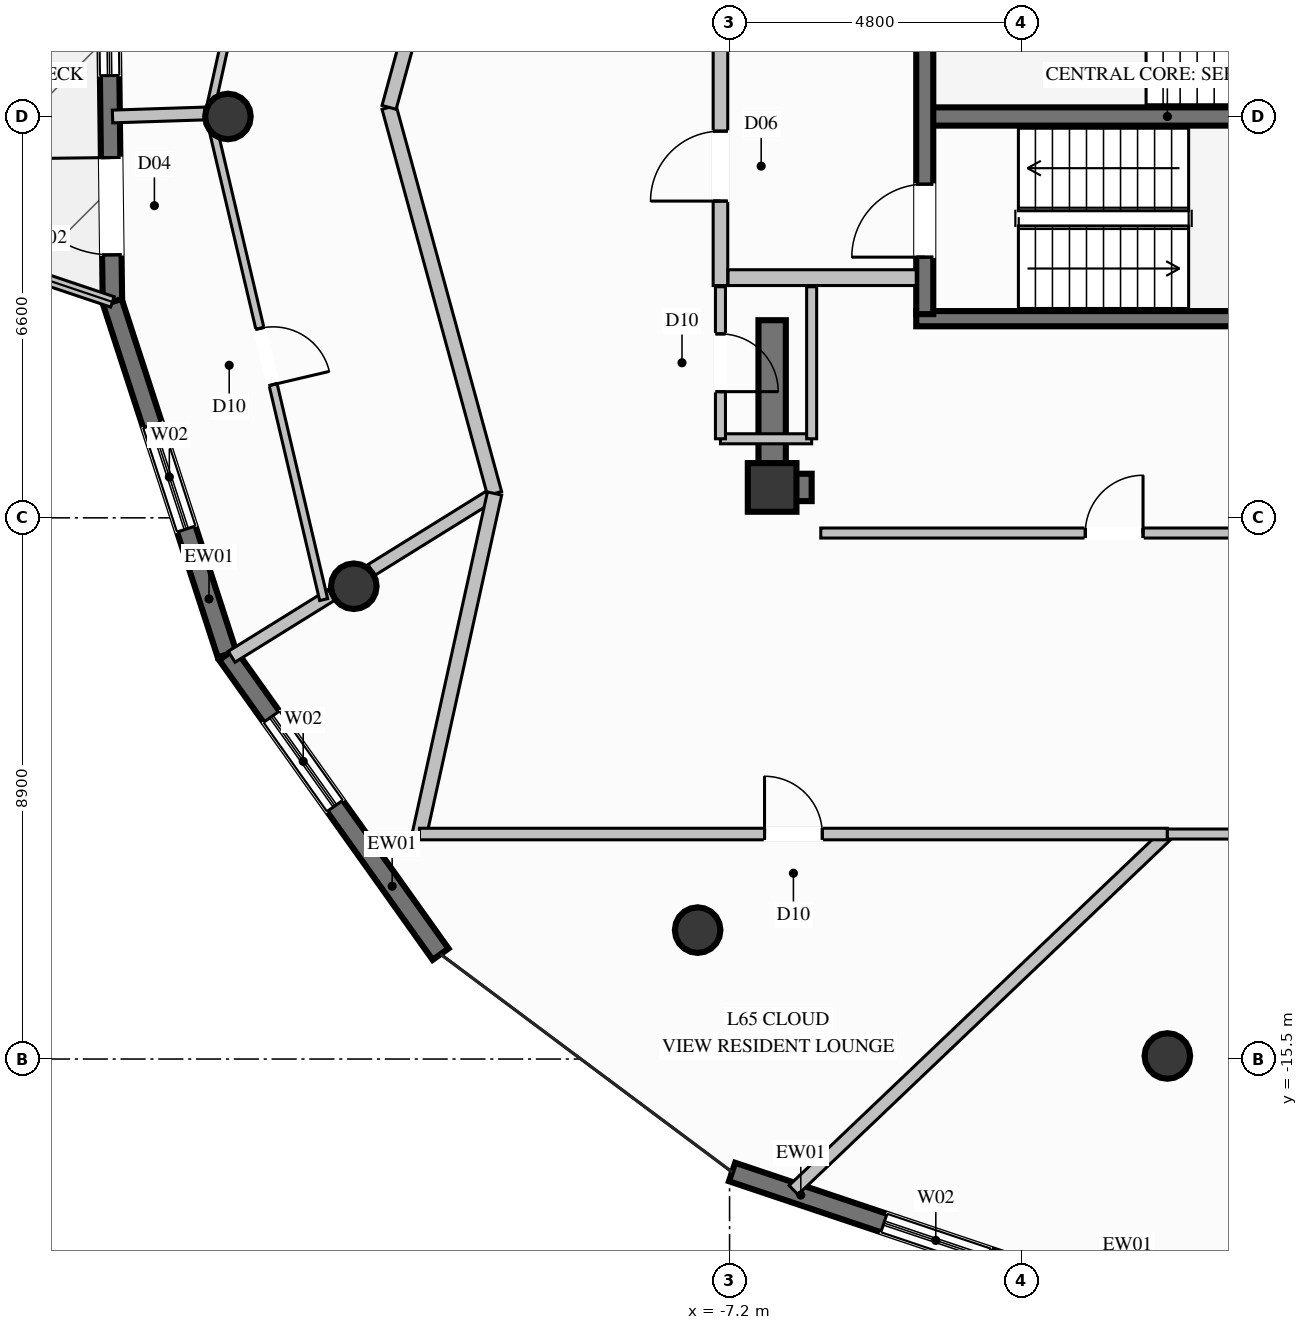
"""IFC4 building model, lengths in metres.
Left out: names, types, materials, properties, quantities, classifications, styles, units other than length and angle.
Written with IfcOpenShell. Run it as: python <this file> out.ifc"""

import sys

from ifc_helpers import new_model, si_unit, direction, frame, frame_2d, origin, origin_2d, place, context, subcontext, project, spatial, rectangle, circle, extrude, element, fill, save


model = new_model("IFC4")
c1 = context("Model", 3, precision=1e-05, world=origin(), true_north=direction((0.0, 1.0)))
c2 = subcontext(c1, "Body", "Model", "MODEL_VIEW")
j1 = project(units=[si_unit("LENGTHUNIT", "METRE"), si_unit("PLANEANGLEUNIT", "RADIAN")], contexts=[c1])
p1 = place(None, origin())
s1 = spatial("IfcSite", under=j1, at=p1, CompositionType="ELEMENT")
p2 = place(p1, origin())
s2 = spatial("IfcBuilding", under=s1, at=p2, CompositionType="ELEMENT")
p3 = place(p2, frame((0.0, 0.0, 250.6)))
s3 = spatial("IfcBuildingStorey", under=s2, at=p3, CompositionType="ELEMENT", Elevation=250.6)
p4 = place(p3, frame((-6.5, -6.1, 0.0), z_axis=(0.0, 0.0, 1.0), x_axis=(1.0, 0.0, 0.0)))
e1 = element("IfcColumn", 1, at=p4, inside=s3, PredefinedType="COLUMN", context=c2, shape_type="SweptSolid", body=[
    extrude(rectangle(XDim=0.8, YDim=0.8, at=origin_2d()), origin(), (0.0, 0.0, 1.0), 3.8),
])
p5 = place(p3, frame((-3.99, 0.0, 0.0), z_axis=(0.0, 0.0, 1.0), x_axis=(1.0, 0.0, 0.0)))
e2 = element("IfcWall", 2, at=p5, inside=s3, PredefinedType="SHEAR", context=c2, shape_type="SweptSolid", body=[
    extrude(rectangle(XDim=7.98, YDim=0.3, at=frame_2d((3.99, 0.0))), origin(), (0.0, 0.0, 1.0), 3.8),
])
p6 = place(p3, frame((-4.13, -3.325, 0.0), z_axis=(0.0, 0.0, 1.0), x_axis=(1.0, 0.0, 0.0)))
e3 = element("IfcWall", 3, at=p6, inside=s3, PredefinedType="SOLIDWALL", context=c2, shape_type="SweptSolid", body=[
    extrude(rectangle(XDim=8.26, YDim=0.25, at=frame_2d((4.13, 0.0))), origin(), (0.0, 0.0, 1.0), 3.8),
])
p7 = place(p3, frame((-6.275, -6.1, 0.0), z_axis=(0.0, 0.0, 1.0), x_axis=(1.0, 0.0, 0.0)))
e4 = element("IfcWall", 4, at=p7, inside=s3, PredefinedType="SHEAR", context=c2, shape_type="SweptSolid", body=[
    extrude(rectangle(XDim=0.425, YDim=0.45, at=frame_2d((0.212, 0.0))), origin(), (0.0, 0.0, 1.0), 3.8),
])
p8 = place(p3, frame((-6.5, -6.325, 0.0), z_axis=(0.0, 0.0, 1.0), x_axis=(0.0, 1.0, 0.0)))
e5 = element("IfcWall", 5, at=p8, inside=s3, PredefinedType="SHEAR", context=c2, shape_type="SweptSolid", body=[
    extrude(rectangle(XDim=2.975, YDim=0.45, at=frame_2d((1.487, 0.0))), origin(), (0.0, 0.0, 1.0), 3.8),
])
for number, where, z_axis, x_axis in (
    (6, (-15.45, 0.0, 0.0), (0.0, 0.0, 1.0), (1.0, 0.0, 0.0)),
    (7, (-13.38, -7.725, 0.0), (0.0, 0.0, 1.0), (1.0, 0.0, 0.0)),
    (8, (-7.725, -13.38, 0.0), (0.0, 0.0, 1.0), (1.0, 0.0, 0.0)),
    (9, (0.0, -15.45, 0.0), (0.0, 0.0, 1.0), (1.0, 0.0, 0.0)),
):
    element("IfcColumn", number, at=place(p3, frame(where, z_axis=z_axis, x_axis=x_axis)), inside=s3, PredefinedType="COLUMN", context=c2, shape_type="SweptSolid", body=[
        extrude(circle(Radius=0.375, at=origin_2d()), origin(), (0.0, 0.0, 1.0), 3.8),
    ])
p9 = place(p3, frame((-17.35, -3.049, 0.0), z_axis=(0.0, 0.0, 1.0), x_axis=(-0.012298256588, 0.999924373583, 0.0)))
e10 = element("IfcWall", 10, at=p9, inside=s3, PredefinedType="SOLIDWALL", context=c2, shape_type="SweptSolid", body=[
    extrude(rectangle(XDim=6.094, YDim=0.32, at=frame_2d((3.047, 0.0))), origin(), (0.0, 0.0, 1.0), 3.57),
])
p10 = place(p9, frame((3.722, 0.0, 0.35)))
e11 = element("IfcOpeningElement", 11, at=p10, cuts=e10, PredefinedType="OPENING", context=c2, shape_type="SweptSolid", body=[
    extrude(rectangle(XDim=1.8, YDim=2.6, at=frame_2d((0.9, 1.3))), frame((0.0, 0.17, 0.0), z_axis=(0.0, -1.0, 0.0), x_axis=(1.0, 0.0, 0.0)), (0.0, 0.0, 1.0), 0.34),
])
p11 = place(p9, frame((0.774, 0.0, 0.0)))
e12 = element("IfcOpeningElement", 12, at=p11, cuts=e10, PredefinedType="OPENING", context=c2, shape_type="SweptSolid", body=[
    extrude(rectangle(XDim=1.6, YDim=2.3, at=frame_2d((0.8, 1.15))), frame((0.0, 0.17, 0.0), z_axis=(0.0, -1.0, 0.0), x_axis=(1.0, 0.0, 0.0)), (0.0, 0.0, 1.0), 0.34),
])
p12 = place(p3, frame((-15.465, -8.846, 0.0), z_axis=(0.0, 0.0, 1.0), x_axis=(-0.309238214559, 0.950984609053, 0.0)))
e13 = element("IfcWall", 13, at=p12, inside=s3, PredefinedType="SOLIDWALL", context=c2, shape_type="SweptSolid", body=[
    extrude(rectangle(XDim=6.096, YDim=0.32, at=frame_2d((3.048, 0.0))), origin(), (0.0, 0.0, 1.0), 3.57),
])
p13 = place(p12, frame((2.168, 0.0, 0.35)))
e14 = element("IfcOpeningElement", 14, at=p13, cuts=e13, PredefinedType="OPENING", context=c2, shape_type="SweptSolid", body=[
    extrude(rectangle(XDim=1.8, YDim=2.6, at=frame_2d((0.9, 1.3))), frame((0.0, 0.17, 0.0), z_axis=(0.0, -1.0, 0.0), x_axis=(1.0, 0.0, 0.0)), (0.0, 0.0, 1.0), 0.34),
])
p14 = place(p3, frame((-11.953, -13.776, 0.0), z_axis=(0.0, 0.0, 1.0), x_axis=(-0.580234325627, 0.814449585526, 0.0)))
e15 = element("IfcWall", 15, at=p14, inside=s3, PredefinedType="SOLIDWALL", context=c2, shape_type="SweptSolid", body=[
    extrude(rectangle(XDim=6.053, YDim=0.32, at=frame_2d((3.026, 0.0))), origin(), (0.0, 0.0, 1.0), 3.57),
])
p15 = place(p14, frame((2.994, 0.0, 0.35)))
e16 = element("IfcOpeningElement", 16, at=p15, cuts=e15, PredefinedType="OPENING", context=c2, shape_type="SweptSolid", body=[
    extrude(rectangle(XDim=1.8, YDim=2.6, at=frame_2d((0.9, 1.3))), frame((0.0, 0.17, 0.0), z_axis=(0.0, -1.0, 0.0), x_axis=(1.0, 0.0, 0.0)), (0.0, 0.0, 1.0), 0.34),
])
p16 = place(p3, frame((-1.551, -19.241, 0.0), z_axis=(0.0, 0.0, 1.0), x_axis=(-0.947983518986, 0.31831941149, 0.0)))
e17 = element("IfcWall", 17, at=p16, inside=s3, PredefinedType="SOLIDWALL", context=c2, shape_type="SweptSolid", body=[
    extrude(rectangle(XDim=5.916, YDim=0.32, at=frame_2d((2.958, 0.0))), origin(), (0.0, 0.0, 1.0), 3.57),
])
p17 = place(p16, frame((1.481, 0.0, 0.35)))
e18 = element("IfcOpeningElement", 18, at=p17, cuts=e17, PredefinedType="OPENING", context=c2, shape_type="SweptSolid", body=[
    extrude(rectangle(XDim=1.8, YDim=2.6, at=frame_2d((0.9, 1.3))), frame((0.0, 0.17, 0.0), z_axis=(0.0, -1.0, 0.0), x_axis=(1.0, 0.0, 0.0)), (0.0, 0.0, 1.0), 0.34),
])
p18 = place(p3, frame((-19.525, -2.318, 0.0), z_axis=(0.0, 0.0, 1.0), x_axis=(0.947892929032, -0.318589069322, 0.0)))
e19 = element("IfcWall", 19, at=p18, inside=s3, PredefinedType="PARAPET", context=c2, shape_type="SweptSolid", body=[
    extrude(rectangle(XDim=2.294, YDim=0.18, at=frame_2d((1.147, 0.0))), origin(), (0.0, 0.0, 1.0), 1.12),
])
p19 = place(p3, frame((-3.99, -3.25, 0.0), z_axis=(0.0, 0.0, 1.0), x_axis=(0.0, 1.0, 0.0)))
e20 = element("IfcWall", 20, at=p19, inside=s3, PredefinedType="SOLIDWALL", context=c2, shape_type="SweptSolid", body=[
    extrude(rectangle(XDim=5.46, YDim=0.28, at=frame_2d((2.73, 0.0))), origin(), (0.0, 0.0, 1.0), 3.57),
])
p20 = place(p19, frame((0.937, 0.0, 0.0)))
e21 = element("IfcOpeningElement", 21, at=p20, cuts=e20, PredefinedType="OPENING", context=c2, shape_type="SweptSolid", body=[
    extrude(rectangle(XDim=1.2, YDim=2.2, at=frame_2d((0.6, 1.1))), frame((0.0, 0.15, 0.0), z_axis=(0.0, -1.0, 0.0), x_axis=(1.0, 0.0, 0.0)), (0.0, 0.0, 1.0), 0.3),
])
p21 = place(p3, frame((-7.35, -2.78, 0.0), z_axis=(0.0, 0.0, 1.0), x_axis=(0.0, 1.0, 0.0)))
e22 = element("IfcWall", 22, at=p21, inside=s3, PredefinedType="PARTITIONING", context=c2, shape_type="SweptSolid", body=[
    extrude(rectangle(XDim=5.12, YDim=0.24, at=frame_2d((2.56, 0.0))), origin(), (0.0, 0.0, 1.0), 2.655),
])
p22 = place(p21, frame((1.389, 0.0, 0.0)))
e23 = element("IfcOpeningElement", 23, at=p22, cuts=e22, PredefinedType="OPENING", context=c2, shape_type="SweptSolid", body=[
    extrude(rectangle(XDim=1.15, YDim=2.2, at=frame_2d((0.575, 1.1))), frame((0.0, 0.13, 0.0), z_axis=(0.0, -1.0, 0.0), x_axis=(1.0, 0.0, 0.0)), (0.0, 0.0, 1.0), 0.26),
])
p23 = place(p3, frame((-7.225, -2.65, 0.0), z_axis=(0.0, 0.0, 1.0), x_axis=(1.0, 0.0, 0.0)))
e24 = element("IfcWall", 24, at=p23, inside=s3, PredefinedType="PARTITIONING", context=c2, shape_type="SweptSolid", body=[
    extrude(rectangle(XDim=3.095, YDim=0.26, at=frame_2d((1.548, 0.0))), origin(), (0.0, 0.0, 1.0), 3.57),
])
p24 = place(p3, frame((-7.35, -5.3, 0.0), z_axis=(0.0, 0.0, 1.0), x_axis=(1.0, 0.0, 0.0)))
e25 = element("IfcWall", 25, at=p24, inside=s3, PredefinedType="PARTITIONING", context=c2, shape_type="SweptSolid", body=[
    extrude(rectangle(XDim=1.5, YDim=0.165, at=frame_2d((0.75, 0.0))), origin(), (0.0, 0.0, 1.0), 2.655),
])
p25 = place(p3, frame((-5.85, -5.3, 0.0), z_axis=(0.0, 0.0, 1.0), x_axis=(0.0, 1.0, 0.0)))
e26 = element("IfcWall", 26, at=p25, inside=s3, PredefinedType="PARTITIONING", context=c2, shape_type="SweptSolid", body=[
    extrude(rectangle(XDim=2.5, YDim=0.165, at=frame_2d((1.25, 0.0))), origin(), (0.0, 0.0, 1.0), 2.655),
])
p26 = place(p3, frame((-7.35, -2.8, 0.0), z_axis=(0.0, 0.0, 1.0), x_axis=(0.0, -1.0, 0.0)))
e27 = element("IfcWall", 27, at=p26, inside=s3, PredefinedType="PARTITIONING", context=c2, shape_type="SweptSolid", body=[
    extrude(rectangle(XDim=2.5, YDim=0.165, at=frame_2d((1.25, 0.0))), origin(), (0.0, 0.0, 1.0), 3.57),
])
p27 = place(p26, frame((0.775, 0.0, 0.0)))
e28 = element("IfcOpeningElement", 28, at=p27, cuts=e27, PredefinedType="OPENING", context=c2, shape_type="SweptSolid", body=[
    extrude(rectangle(XDim=0.95, YDim=2.1, at=frame_2d((0.475, 1.05))), frame((0.0, 0.093, 0.0), z_axis=(0.0, -1.0, 0.0), x_axis=(1.0, 0.0, 0.0)), (0.0, 0.0, 1.0), 0.185),
])
p28 = place(p3, frame((-5.7, -6.85, 0.0), z_axis=(0.0, 0.0, 1.0), x_axis=(1.0, 0.0, 0.0)))
e29 = element("IfcWall", 29, at=p28, inside=s3, PredefinedType="PARTITIONING", context=c2, shape_type="SweptSolid", body=[
    extrude(rectangle(XDim=9.65, YDim=0.165, at=frame_2d((4.825, 0.0))), origin(), (0.0, 0.0, 1.0), 2.655),
])
p29 = place(p28, frame((4.35, 0.0, 0.0)))
e30 = element("IfcOpeningElement", 30, at=p29, cuts=e29, PredefinedType="OPENING", context=c2, shape_type="SweptSolid", body=[
    extrude(rectangle(XDim=0.95, YDim=2.1, at=frame_2d((0.475, 1.05))), frame((0.0, 0.093, 0.0), z_axis=(0.0, -1.0, 0.0), x_axis=(1.0, 0.0, 0.0)), (0.0, 0.0, 1.0), 0.185),
])
p30 = place(p3, frame((-11.065, -6.2, 0.0), z_axis=(0.0, 0.0, 1.0), x_axis=(-0.84962275773, -0.527390907722, 0.0)))
e31 = element("IfcWall", 31, at=p30, inside=s3, PredefinedType="PARTITIONING", context=c2, shape_type="SweptSolid", body=[
    extrude(rectangle(XDim=2.384, YDim=0.21, at=frame_2d((1.192, 0.0))), origin(), (0.0, 0.0, 1.0), 3.086),
])
p31 = place(p3, frame((-13.749, -7.867, 0.0), z_axis=(0.0, 0.0, 1.0), x_axis=(-0.849593260604, -0.527438424403, 0.0)))
e32 = element("IfcWall", 32, at=p31, inside=s3, PredefinedType="PARTITIONING", context=c2, shape_type="SweptSolid", body=[
    extrude(rectangle(XDim=1.93, YDim=0.21, at=frame_2d((0.965, 0.0))), origin(), (0.0, 0.0, 1.0), 3.57),
])
p32 = place(p3, frame((-15.756, 0.052, 0.0), z_axis=(0.0, 0.0, 1.0), x_axis=(-0.999466804389, -0.032651292843, 0.0)))
e33 = element("IfcWall", 33, at=p32, inside=s3, PredefinedType="PARTITIONING", context=c2, shape_type="SweptSolid", body=[
    extrude(rectangle(XDim=1.593, YDim=0.21, at=frame_2d((0.796, 0.0))), origin(), (0.0, 0.0, 1.0), 3.57),
])
p33 = place(p3, frame((-12.8, 0.15, 0.0), z_axis=(0.0, 0.0, 1.0), x_axis=(0.263588113382, -0.964635323054, 0.0)))
e34 = element("IfcWall", 34, at=p33, inside=s3, PredefinedType="PARTITIONING", context=c2, shape_type="SweptSolid", body=[
    extrude(rectangle(XDim=6.583, YDim=0.24, at=frame_2d((3.292, 0.0))), origin(), (0.0, 0.0, 1.0), 3.57),
])
p34 = place(p3, frame((-11.794, 3.833, 0.0), z_axis=(0.0, 0.0, 1.0), x_axis=(-0.263512359615, -0.964656019693, 0.0)))
e35 = element("IfcWall", 35, at=p34, inside=s3, PredefinedType="PARTITIONING", context=c2, shape_type="SweptSolid", body=[
    extrude(rectangle(XDim=3.818, YDim=0.24, at=frame_2d((1.909, 0.0))), origin(), (0.0, 0.0, 1.0), 3.57),
])
p35 = place(p34, frame((1.359, 0.0, 0.0)))
e36 = element("IfcOpeningElement", 36, at=p35, cuts=e35, PredefinedType="OPENING", context=c2, shape_type="SweptSolid", body=[
    extrude(rectangle(XDim=1.1, YDim=2.3, at=frame_2d((0.55, 1.15))), frame((0.0, 0.13, 0.0), z_axis=(0.0, -1.0, 0.0), x_axis=(1.0, 0.0, 0.0)), (0.0, 0.0, 1.0), 0.26),
])
p36 = place(p3, frame((-13.975, 8.107, 0.0), z_axis=(0.0, 0.0, 1.0), x_axis=(-0.215893129174, -0.97641699943, 0.0)))
e37 = element("IfcWall", 37, at=p36, inside=s3, PredefinedType="PARTITIONING", context=c2, shape_type="SweptSolid", body=[
    extrude(rectangle(XDim=8.25, YDim=0.135, at=frame_2d((4.125, 0.0))), origin(), (0.0, 0.0, 1.0), 3.139),
])
p37 = place(p36, frame((3.65, 0.0, 0.0)))
e38 = element("IfcOpeningElement", 38, at=p37, cuts=e37, PredefinedType="OPENING", context=c2, shape_type="SweptSolid", body=[
    extrude(rectangle(XDim=0.95, YDim=2.1, at=frame_2d((0.475, 1.05))), frame((0.0, 0.078, 0.0), z_axis=(0.0, -1.0, 0.0), x_axis=(1.0, 0.0, 0.0)), (0.0, 0.0, 1.0), 0.155),
])
p38 = place(p3, frame((-15.756, 0.052, 0.0), z_axis=(0.0, 0.0, 1.0), x_axis=(0.228862090804, -0.973458855521, 0.0)))
e39 = element("IfcWall", 39, at=p38, inside=s3, PredefinedType="PARTITIONING", context=c2, shape_type="SweptSolid", body=[
    extrude(rectangle(XDim=8.215, YDim=0.135, at=frame_2d((4.107, 0.0))), origin(), (0.0, 0.0, 1.0), 3.139),
])
p39 = place(p38, frame((3.633, 0.0, 0.0)))
e40 = element("IfcOpeningElement", 40, at=p39, cuts=e39, PredefinedType="OPENING", context=c2, shape_type="SweptSolid", body=[
    extrude(rectangle(XDim=0.95, YDim=2.1, at=frame_2d((0.475, 1.05))), frame((0.0, 0.078, 0.0), z_axis=(0.0, -1.0, 0.0), x_axis=(1.0, 0.0, 0.0)), (0.0, 0.0, 1.0), 0.155),
])
p40 = place(p3, frame((0.0, -11.8, 0.0), z_axis=(0.0, 0.0, 1.0), x_axis=(-0.724150240548, -0.689642247193, 0.0)))
e41 = element("IfcWall", 41, at=p40, inside=s3, PredefinedType="PARTITIONING", context=c2, shape_type="SweptSolid", body=[
    extrude(rectangle(XDim=8.49, YDim=0.21, at=frame_2d((4.245, 0.0))), origin(), (0.0, 0.0, 1.0), 3.57),
])
p41 = place(p3, frame((-11.065, -6.2, 0.0), z_axis=(0.0, 0.0, 1.0), x_axis=(-0.215375028734, -0.976531411168, 0.0)))
e42 = element("IfcWall", 42, at=p41, inside=s3, PredefinedType="PARTITIONING", context=c2, shape_type="SweptSolid", body=[
    extrude(rectangle(XDim=5.735, YDim=0.24, at=frame_2d((2.867, 0.0))), origin(), (0.0, 0.0, 1.0), 3.57),
])
p42 = place(p3, frame((-12.3, -11.8, 0.0), z_axis=(0.0, 0.0, 1.0), x_axis=(1.0, 0.0, 0.0)))
e43 = element("IfcWall", 43, at=p42, inside=s3, PredefinedType="PARTITIONING", context=c2, shape_type="SweptSolid", body=[
    extrude(rectangle(XDim=12.3, YDim=0.19, at=frame_2d((6.15, 0.0))), origin(), (0.0, 0.0, 1.0), 3.57),
])
p43 = place(p42, frame((5.675, 0.0, 0.0)))
e44 = element("IfcOpeningElement", 44, at=p43, cuts=e43, PredefinedType="OPENING", context=c2, shape_type="SweptSolid", body=[
    extrude(rectangle(XDim=0.95, YDim=2.1, at=frame_2d((0.475, 1.05))), frame((0.0, 0.105, 0.0), z_axis=(0.0, -1.0, 0.0), x_axis=(1.0, 0.0, 0.0)), (0.0, 0.0, 1.0), 0.21),
])
p44 = place(p3, frame((0.0, -11.8, 0.0), z_axis=(0.0, 0.0, 1.0), x_axis=(1.0, 0.0, 0.0)))
e45 = element("IfcWall", 45, at=p44, inside=s3, PredefinedType="PARTITIONING", context=c2, shape_type="SweptSolid", body=[
    extrude(rectangle(XDim=12.3, YDim=0.165, at=frame_2d((6.15, 0.0))), origin(), (0.0, 0.0, 1.0), 3.57),
])
p45 = place(p44, frame((5.675, 0.0, 0.0)))
e46 = element("IfcOpeningElement", 46, at=p45, cuts=e45, PredefinedType="OPENING", context=c2, shape_type="SweptSolid", body=[
    extrude(rectangle(XDim=0.95, YDim=2.1, at=frame_2d((0.475, 1.05))), frame((0.0, 0.093, 0.0), z_axis=(0.0, -1.0, 0.0), x_axis=(1.0, 0.0, 0.0)), (0.0, 0.0, 1.0), 0.185),
])
p46 = place(p10, origin())
e47 = element("IfcWindow", 47, at=p46, inside=s3, PartitioningType="SINGLE_PANEL", PredefinedType="WINDOW", context=c2, shape_type="SweptSolid", body=[
    extrude(rectangle(XDim=1.8, YDim=2.6, at=frame_2d((0.9, 1.3))), frame((0.0, 0.03, 0.0), z_axis=(0.0, -1.0, 0.0), x_axis=(1.0, 0.0, 0.0)), (0.0, 0.0, 1.0), 0.06),
])
fill(e11, e47)
p47 = place(p11, origin())
e48 = element("IfcDoor", 48, at=p47, inside=s3, OperationType="SINGLE_SWING_RIGHT", PredefinedType="DOOR", context=c2, shape_type="SweptSolid", body=[
    extrude(rectangle(XDim=1.6, YDim=2.3, at=frame_2d((0.8, 1.15))), frame((0.0, 0.025, 0.0), z_axis=(0.0, -1.0, 0.0), x_axis=(1.0, 0.0, 0.0)), (0.0, 0.0, 1.0), 0.05),
])
fill(e12, e48)
p48 = place(p13, origin())
e49 = element("IfcWindow", 49, at=p48, inside=s3, PartitioningType="SINGLE_PANEL", PredefinedType="WINDOW", context=c2, shape_type="SweptSolid", body=[
    extrude(rectangle(XDim=1.8, YDim=2.6, at=frame_2d((0.9, 1.3))), frame((0.0, 0.03, 0.0), z_axis=(0.0, -1.0, 0.0), x_axis=(1.0, 0.0, 0.0)), (0.0, 0.0, 1.0), 0.06),
])
fill(e14, e49)
p49 = place(p15, origin())
e50 = element("IfcWindow", 50, at=p49, inside=s3, PartitioningType="SINGLE_PANEL", PredefinedType="WINDOW", context=c2, shape_type="SweptSolid", body=[
    extrude(rectangle(XDim=1.8, YDim=2.6, at=frame_2d((0.9, 1.3))), frame((0.0, 0.03, 0.0), z_axis=(0.0, -1.0, 0.0), x_axis=(1.0, 0.0, 0.0)), (0.0, 0.0, 1.0), 0.06),
])
fill(e16, e50)
p50 = place(p17, origin())
e51 = element("IfcWindow", 51, at=p50, inside=s3, PartitioningType="SINGLE_PANEL", PredefinedType="WINDOW", context=c2, shape_type="SweptSolid", body=[
    extrude(rectangle(XDim=1.8, YDim=2.6, at=frame_2d((0.9, 1.3))), frame((0.0, 0.03, 0.0), z_axis=(0.0, -1.0, 0.0), x_axis=(1.0, 0.0, 0.0)), (0.0, 0.0, 1.0), 0.06),
])
fill(e18, e51)
p51 = place(p20, origin())
e52 = element("IfcDoor", 52, at=p51, inside=s3, OperationType="SINGLE_SWING_LEFT", PredefinedType="DOOR", context=c2, shape_type="SweptSolid", body=[
    extrude(rectangle(XDim=1.2, YDim=2.2, at=frame_2d((0.6, 1.1))), frame((0.0, 0.025, 0.0), z_axis=(0.0, -1.0, 0.0), x_axis=(1.0, 0.0, 0.0)), (0.0, 0.0, 1.0), 0.05),
])
fill(e21, e52)
p52 = place(p22, origin())
e53 = element("IfcDoor", 53, at=p52, inside=s3, OperationType="SINGLE_SWING_LEFT", PredefinedType="DOOR", context=c2, shape_type="SweptSolid", body=[
    extrude(rectangle(XDim=1.15, YDim=2.2, at=frame_2d((0.575, 1.1))), frame((0.0, 0.025, 0.0), z_axis=(0.0, -1.0, 0.0), x_axis=(1.0, 0.0, 0.0)), (0.0, 0.0, 1.0), 0.05),
])
fill(e23, e53)
p53 = place(p27, origin())
e54 = element("IfcDoor", 54, at=p53, inside=s3, OperationType="SINGLE_SWING_RIGHT", PredefinedType="DOOR", context=c2, shape_type="SweptSolid", body=[
    extrude(rectangle(XDim=0.95, YDim=2.1, at=frame_2d((0.475, 1.05))), frame((0.0, 0.025, 0.0), z_axis=(0.0, -1.0, 0.0), x_axis=(1.0, 0.0, 0.0)), (0.0, 0.0, 1.0), 0.05),
])
fill(e28, e54)
p54 = place(p29, origin())
e55 = element("IfcDoor", 55, at=p54, inside=s3, OperationType="SINGLE_SWING_RIGHT", PredefinedType="DOOR", context=c2, shape_type="SweptSolid", body=[
    extrude(rectangle(XDim=0.95, YDim=2.1, at=frame_2d((0.475, 1.05))), frame((0.0, 0.025, 0.0), z_axis=(0.0, -1.0, 0.0), x_axis=(1.0, 0.0, 0.0)), (0.0, 0.0, 1.0), 0.05),
])
fill(e30, e55)
p55 = place(p39, origin())
e56 = element("IfcDoor", 56, at=p55, inside=s3, OperationType="SINGLE_SWING_RIGHT", PredefinedType="DOOR", context=c2, shape_type="SweptSolid", body=[
    extrude(rectangle(XDim=0.95, YDim=2.1, at=frame_2d((0.475, 1.05))), frame((0.0, 0.025, 0.0), z_axis=(0.0, -1.0, 0.0), x_axis=(1.0, 0.0, 0.0)), (0.0, 0.0, 1.0), 0.05),
])
fill(e40, e56)
p56 = place(p43, origin())
e57 = element("IfcDoor", 57, at=p56, inside=s3, OperationType="SINGLE_SWING_LEFT", PredefinedType="DOOR", context=c2, shape_type="SweptSolid", body=[
    extrude(rectangle(XDim=0.95, YDim=2.1, at=frame_2d((0.475, 1.05))), frame((0.0, 0.025, 0.0), z_axis=(0.0, -1.0, 0.0), x_axis=(1.0, 0.0, 0.0)), (0.0, 0.0, 1.0), 0.05),
])
fill(e44, e57)
save(model, sys.argv[1])
